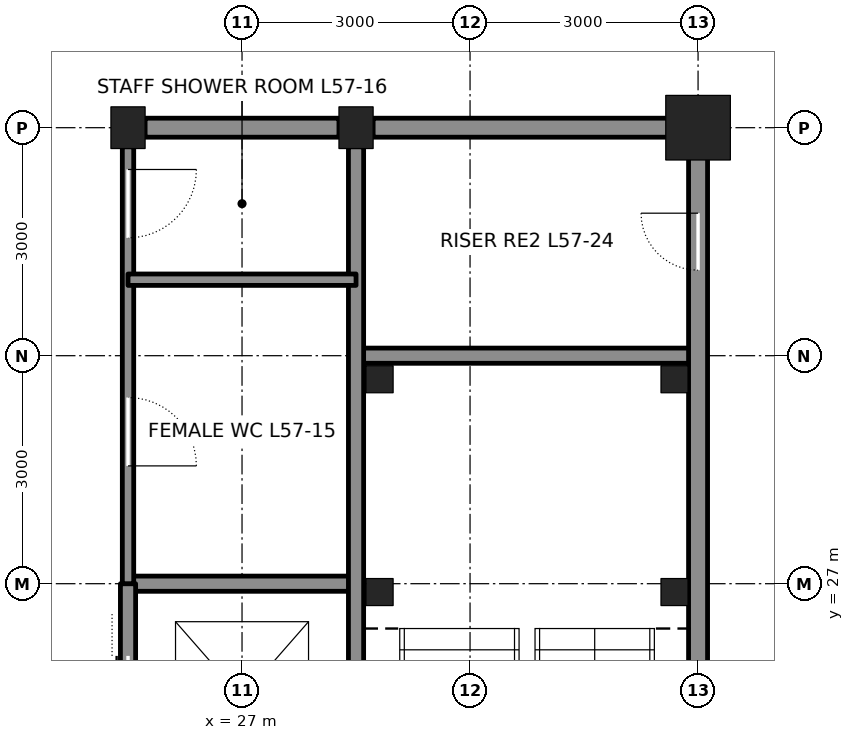
"""IFC4 building model, lengths in metres.
Left out: names, types, materials, properties, quantities, classifications, styles, units other than length and angle.
Written with IfcOpenShell. Run it as: python <this file> out.ifc"""

import sys

from ifc_helpers import new_model, si_unit, direction, frame, frame_2d, origin, origin_2d, place, context, subcontext, project, spatial, rectangle, hollow_rectangle, i_section, extrude, element, fill, save


model = new_model("IFC4")
c1 = context("Model", 3, precision=1e-05, world=origin(), true_north=direction((0.0, 1.0)))
c2 = subcontext(c1, "Body", "Model", "MODEL_VIEW")
j1 = project(units=[si_unit("LENGTHUNIT", "METRE"), si_unit("PLANEANGLEUNIT", "RADIAN")], contexts=[c1])
p1 = place(None, origin())
s1 = spatial("IfcSite", under=j1, at=p1, CompositionType="ELEMENT")
p2 = place(p1, origin())
s2 = spatial("IfcBuilding", under=s1, at=p2, CompositionType="ELEMENT")
p3 = place(p2, frame((0.0, 0.0, 257.7)))
s3 = spatial("IfcBuildingStorey", under=s2, at=p3, CompositionType="ELEMENT", Elevation=257.7)
for number, where, z_axis, x_axis in (
    (1, (25.5, 33.0, 0.0), (0.0, 0.0, 1.0), (1.0, 0.0, 0.0)),
    (2, (28.5, 33.0, 0.0), (0.0, 0.0, 1.0), (1.0, 0.0, 0.0)),
):
    element("IfcColumn", number, at=place(p3, frame(where, z_axis=z_axis, x_axis=x_axis)), inside=s3, PredefinedType="COLUMN", context=c2, shape_type="SweptSolid", body=[
        extrude(i_section(OverallWidth=0.449, OverallDepth=0.549, WebThickness=0.072, FlangeThickness=0.115, at=origin_2d()), origin(), (0.0, 0.0, 1.0), 4.5),
    ])
p4 = place(p3, frame((33.0, 33.0, 0.0), z_axis=(0.0, 0.0, 1.0), x_axis=(1.0, 0.0, 0.0)))
e3 = element("IfcColumn", 3, at=p4, inside=s3, PredefinedType="COLUMN", context=c2, shape_type="SweptSolid", body=[
    extrude(hollow_rectangle(XDim=0.85, YDim=0.85, WallThickness=0.085, at=origin_2d()), origin(), (0.0, 0.0, 1.0), 4.5),
])
p5 = place(p3, frame((25.5, 27.0, 0.0), z_axis=(0.0, 0.0, 1.0), x_axis=(1.0, 0.0, 0.0)))
e4 = element("IfcWall", 4, at=p5, inside=s3, PredefinedType="SOLIDWALL", context=c2, shape_type="SweptSolid", body=[
    extrude(rectangle(XDim=3.0, YDim=0.2, at=frame_2d((1.5, 0.0))), origin(), (0.0, 0.0, 1.0), 4.34),
])
p6 = place(p3, frame((28.5, 30.0, 0.0), z_axis=(0.0, 0.0, 1.0), x_axis=(1.0, 0.0, 0.0)))
e5 = element("IfcWall", 5, at=p6, inside=s3, PredefinedType="SOLIDWALL", context=c2, shape_type="SweptSolid", body=[
    extrude(rectangle(XDim=4.5, YDim=0.2, at=frame_2d((2.25, 0.0))), origin(), (0.0, 0.0, 1.0), 4.34),
])
p7 = place(p3, frame((25.725, 33.0, 0.0), z_axis=(0.0, 0.0, 1.0), x_axis=(1.0, 0.0, 0.0)))
e6 = element("IfcWall", 6, at=p7, inside=s3, PredefinedType="SOLIDWALL", context=c2, shape_type="SweptSolid", body=[
    extrude(rectangle(XDim=2.55, YDim=0.25, at=frame_2d((1.275, 0.0))), origin(), (0.0, 0.0, 1.0), 3.481),
])
p8 = place(p3, frame((28.725, 33.0, 0.0), z_axis=(0.0, 0.0, 1.0), x_axis=(1.0, 0.0, 0.0)))
e7 = element("IfcWall", 7, at=p8, inside=s3, PredefinedType="SOLIDWALL", context=c2, shape_type="SweptSolid", body=[
    extrude(rectangle(XDim=4.025, YDim=0.25, at=frame_2d((2.013, 0.0))), origin(), (0.0, 0.0, 1.0), 3.481),
])
p9 = place(p3, frame((25.5, 15.0, 0.0), z_axis=(0.0, 0.0, 1.0), x_axis=(0.0, 1.0, 0.0)))
e8 = element("IfcWall", 8, at=p9, inside=s3, PredefinedType="SOLIDWALL", context=c2, shape_type="SweptSolid", body=[
    extrude(rectangle(XDim=12.0, YDim=0.2, at=frame_2d((6.0, 0.0))), origin(), (0.0, 0.0, 1.0), 3.365),
])
p10 = place(p9, frame((0.95, 0.0, 0.0)))
e9 = element("IfcOpeningElement", 9, at=p10, cuts=e8, PredefinedType="OPENING", context=c2, shape_type="SweptSolid", body=[
    extrude(rectangle(XDim=1.1, YDim=2.1, at=frame_2d((0.55, 1.05))), frame((0.0, 0.11, 0.0), z_axis=(0.0, -1.0, 0.0), x_axis=(1.0, 0.0, 0.0)), (0.0, 0.0, 1.0), 0.22),
])
p11 = place(p9, frame((3.95, 0.0, 0.0)))
e10 = element("IfcOpeningElement", 10, at=p11, cuts=e8, PredefinedType="OPENING", context=c2, shape_type="SweptSolid", body=[
    extrude(rectangle(XDim=1.1, YDim=2.1, at=frame_2d((0.55, 1.05))), frame((0.0, 0.11, 0.0), z_axis=(0.0, -1.0, 0.0), x_axis=(1.0, 0.0, 0.0)), (0.0, 0.0, 1.0), 0.22),
])
p12 = place(p9, frame((6.95, 0.0, 0.0)))
e11 = element("IfcOpeningElement", 11, at=p12, cuts=e8, PredefinedType="OPENING", context=c2, shape_type="SweptSolid", body=[
    extrude(rectangle(XDim=1.1, YDim=2.1, at=frame_2d((0.55, 1.05))), frame((0.0, 0.11, 0.0), z_axis=(0.0, -1.0, 0.0), x_axis=(1.0, 0.0, 0.0)), (0.0, 0.0, 1.0), 0.22),
])
p13 = place(p9, frame((9.95, 0.0, 0.0)))
e12 = element("IfcOpeningElement", 12, at=p13, cuts=e8, PredefinedType="OPENING", context=c2, shape_type="SweptSolid", body=[
    extrude(rectangle(XDim=1.1, YDim=2.1, at=frame_2d((0.55, 1.05))), frame((0.0, 0.11, 0.0), z_axis=(0.0, -1.0, 0.0), x_axis=(1.0, 0.0, 0.0)), (0.0, 0.0, 1.0), 0.22),
])
p14 = place(p3, frame((25.5, 27.0, 0.0), z_axis=(0.0, 0.0, 1.0), x_axis=(0.0, 1.0, 0.0)))
e13 = element("IfcWall", 13, at=p14, inside=s3, PredefinedType="PARTITIONING", context=c2, shape_type="SweptSolid", body=[
    extrude(rectangle(XDim=5.75, YDim=0.15, at=frame_2d((2.875, 0.0))), origin(), (0.0, 0.0, 1.0), 3.365),
])
p15 = place(p14, frame((1.55, 0.0, 0.0)))
e14 = element("IfcOpeningElement", 14, at=p15, cuts=e13, PredefinedType="OPENING", context=c2, shape_type="SweptSolid", body=[
    extrude(rectangle(XDim=0.9, YDim=2.1, at=frame_2d((0.45, 1.05))), frame((0.0, 0.085, 0.0), z_axis=(0.0, -1.0, 0.0), x_axis=(1.0, 0.0, 0.0)), (0.0, 0.0, 1.0), 0.17),
])
p16 = place(p14, frame((4.55, 0.0, 0.0)))
e15 = element("IfcOpeningElement", 15, at=p16, cuts=e13, PredefinedType="OPENING", context=c2, shape_type="SweptSolid", body=[
    extrude(rectangle(XDim=0.9, YDim=2.1, at=frame_2d((0.45, 1.05))), frame((0.0, 0.085, 0.0), z_axis=(0.0, -1.0, 0.0), x_axis=(1.0, 0.0, 0.0)), (0.0, 0.0, 1.0), 0.17),
])
p17 = place(p3, frame((28.5, 24.25, 0.0), z_axis=(0.0, 0.0, 1.0), x_axis=(0.0, 1.0, 0.0)))
e16 = element("IfcWall", 16, at=p17, inside=s3, PredefinedType="SOLIDWALL", context=c2, shape_type="SweptSolid", body=[
    extrude(rectangle(XDim=8.5, YDim=0.2, at=frame_2d((4.25, 0.0))), origin(), (0.0, 0.0, 1.0), 3.413),
])
p18 = place(p3, frame((33.0, 24.25, 0.0), z_axis=(0.0, 0.0, 1.0), x_axis=(0.0, 1.0, 0.0)))
e17 = element("IfcWall", 17, at=p18, inside=s3, PredefinedType="SOLIDWALL", context=c2, shape_type="SweptSolid", body=[
    extrude(rectangle(XDim=8.5, YDim=0.25, at=frame_2d((4.25, 0.0))), origin(), (0.0, 0.0, 1.0), 3.413),
])
p19 = place(p18, frame((6.875, 0.0, 0.0)))
e18 = element("IfcOpeningElement", 18, at=p19, cuts=e17, PredefinedType="OPENING", context=c2, shape_type="SweptSolid", body=[
    extrude(rectangle(XDim=0.75, YDim=2.1, at=frame_2d((0.375, 1.05))), frame((0.0, 0.135, 0.0), z_axis=(0.0, -1.0, 0.0), x_axis=(1.0, 0.0, 0.0)), (0.0, 0.0, 1.0), 0.27),
])
p20 = place(p3, frame((25.5, 31.0, 0.0), z_axis=(0.0, 0.0, 1.0), x_axis=(1.0, 0.0, 0.0)))
e19 = element("IfcWall", 19, at=p20, inside=s3, PredefinedType="PARTITIONING", context=c2, shape_type="SweptSolid", body=[
    extrude(rectangle(XDim=3.0, YDim=0.15, at=frame_2d((1.5, 0.0))), origin(), (0.0, 0.0, 1.0), 4.34),
])
for number, where, z_axis, x_axis in (
    (20, (28.81, 29.69, 0.0), (0.0, 0.0, 1.0), (1.0, 0.0, 0.0)),
    (21, (32.69, 29.69, 0.0), (0.0, 0.0, 1.0), (1.0, 0.0, 0.0)),
    (22, (28.81, 26.89, 0.0), (0.0, 0.0, 1.0), (1.0, 0.0, 0.0)),
    (23, (32.69, 26.89, 0.0), (0.0, 0.0, 1.0), (1.0, 0.0, 0.0)),
):
    element("IfcColumn", number, at=place(p3, frame(where, z_axis=z_axis, x_axis=x_axis)), inside=s3, PredefinedType="COLUMN", context=c2, shape_type="SweptSolid", body=[
        extrude(hollow_rectangle(XDim=0.356, YDim=0.356, WallThickness=0.009, at=origin_2d()), origin(), (0.0, 0.0, 1.0), 4.5),
    ])
p21 = place(p19, origin())
e24 = element("IfcDoor", 24, at=p21, inside=s3, OperationType="SINGLE_SWING_RIGHT", PredefinedType="DOOR", context=c2, shape_type="SweptSolid", body=[
    extrude(rectangle(XDim=0.75, YDim=2.1, at=frame_2d((0.375, 1.05))), frame((0.0, 0.025, 0.0), z_axis=(0.0, -1.0, 0.0), x_axis=(1.0, 0.0, 0.0)), (0.0, 0.0, 1.0), 0.05),
])
fill(e18, e24)
p22 = place(p15, frame((0.9, 0.0, 0.0), z_axis=(0.0, 0.0, 1.0), x_axis=(-1.0, 0.0, 0.0)))
e25 = element("IfcDoor", 25, at=p22, inside=s3, OperationType="SINGLE_SWING_RIGHT", PredefinedType="DOOR", context=c2, shape_type="SweptSolid", body=[
    extrude(rectangle(XDim=0.9, YDim=2.1, at=frame_2d((0.45, 1.05))), frame((0.0, 0.025, 0.0), z_axis=(0.0, -1.0, 0.0), x_axis=(1.0, 0.0, 0.0)), (0.0, 0.0, 1.0), 0.05),
])
fill(e14, e25)
p23 = place(p16, frame((0.9, 0.0, 0.0), z_axis=(0.0, 0.0, 1.0), x_axis=(-1.0, 0.0, 0.0)))
e26 = element("IfcDoor", 26, at=p23, inside=s3, OperationType="SINGLE_SWING_LEFT", PredefinedType="DOOR", context=c2, shape_type="SweptSolid", body=[
    extrude(rectangle(XDim=0.9, YDim=2.1, at=frame_2d((0.45, 1.05))), frame((0.0, 0.025, 0.0), z_axis=(0.0, -1.0, 0.0), x_axis=(1.0, 0.0, 0.0)), (0.0, 0.0, 1.0), 0.05),
])
fill(e15, e26)
p24 = place(p13, origin())
e27 = element("IfcDoor", 27, at=p24, inside=s3, OperationType="DOUBLE_DOOR_SLIDING", PredefinedType="DOOR", context=c2, shape_type="SweptSolid", body=[
    extrude(rectangle(XDim=1.1, YDim=2.1, at=frame_2d((0.55, 1.05))), frame((0.0, 0.025, 0.0), z_axis=(0.0, -1.0, 0.0), x_axis=(1.0, 0.0, 0.0)), (0.0, 0.0, 1.0), 0.05),
])
fill(e12, e27)
save(model, sys.argv[1])
